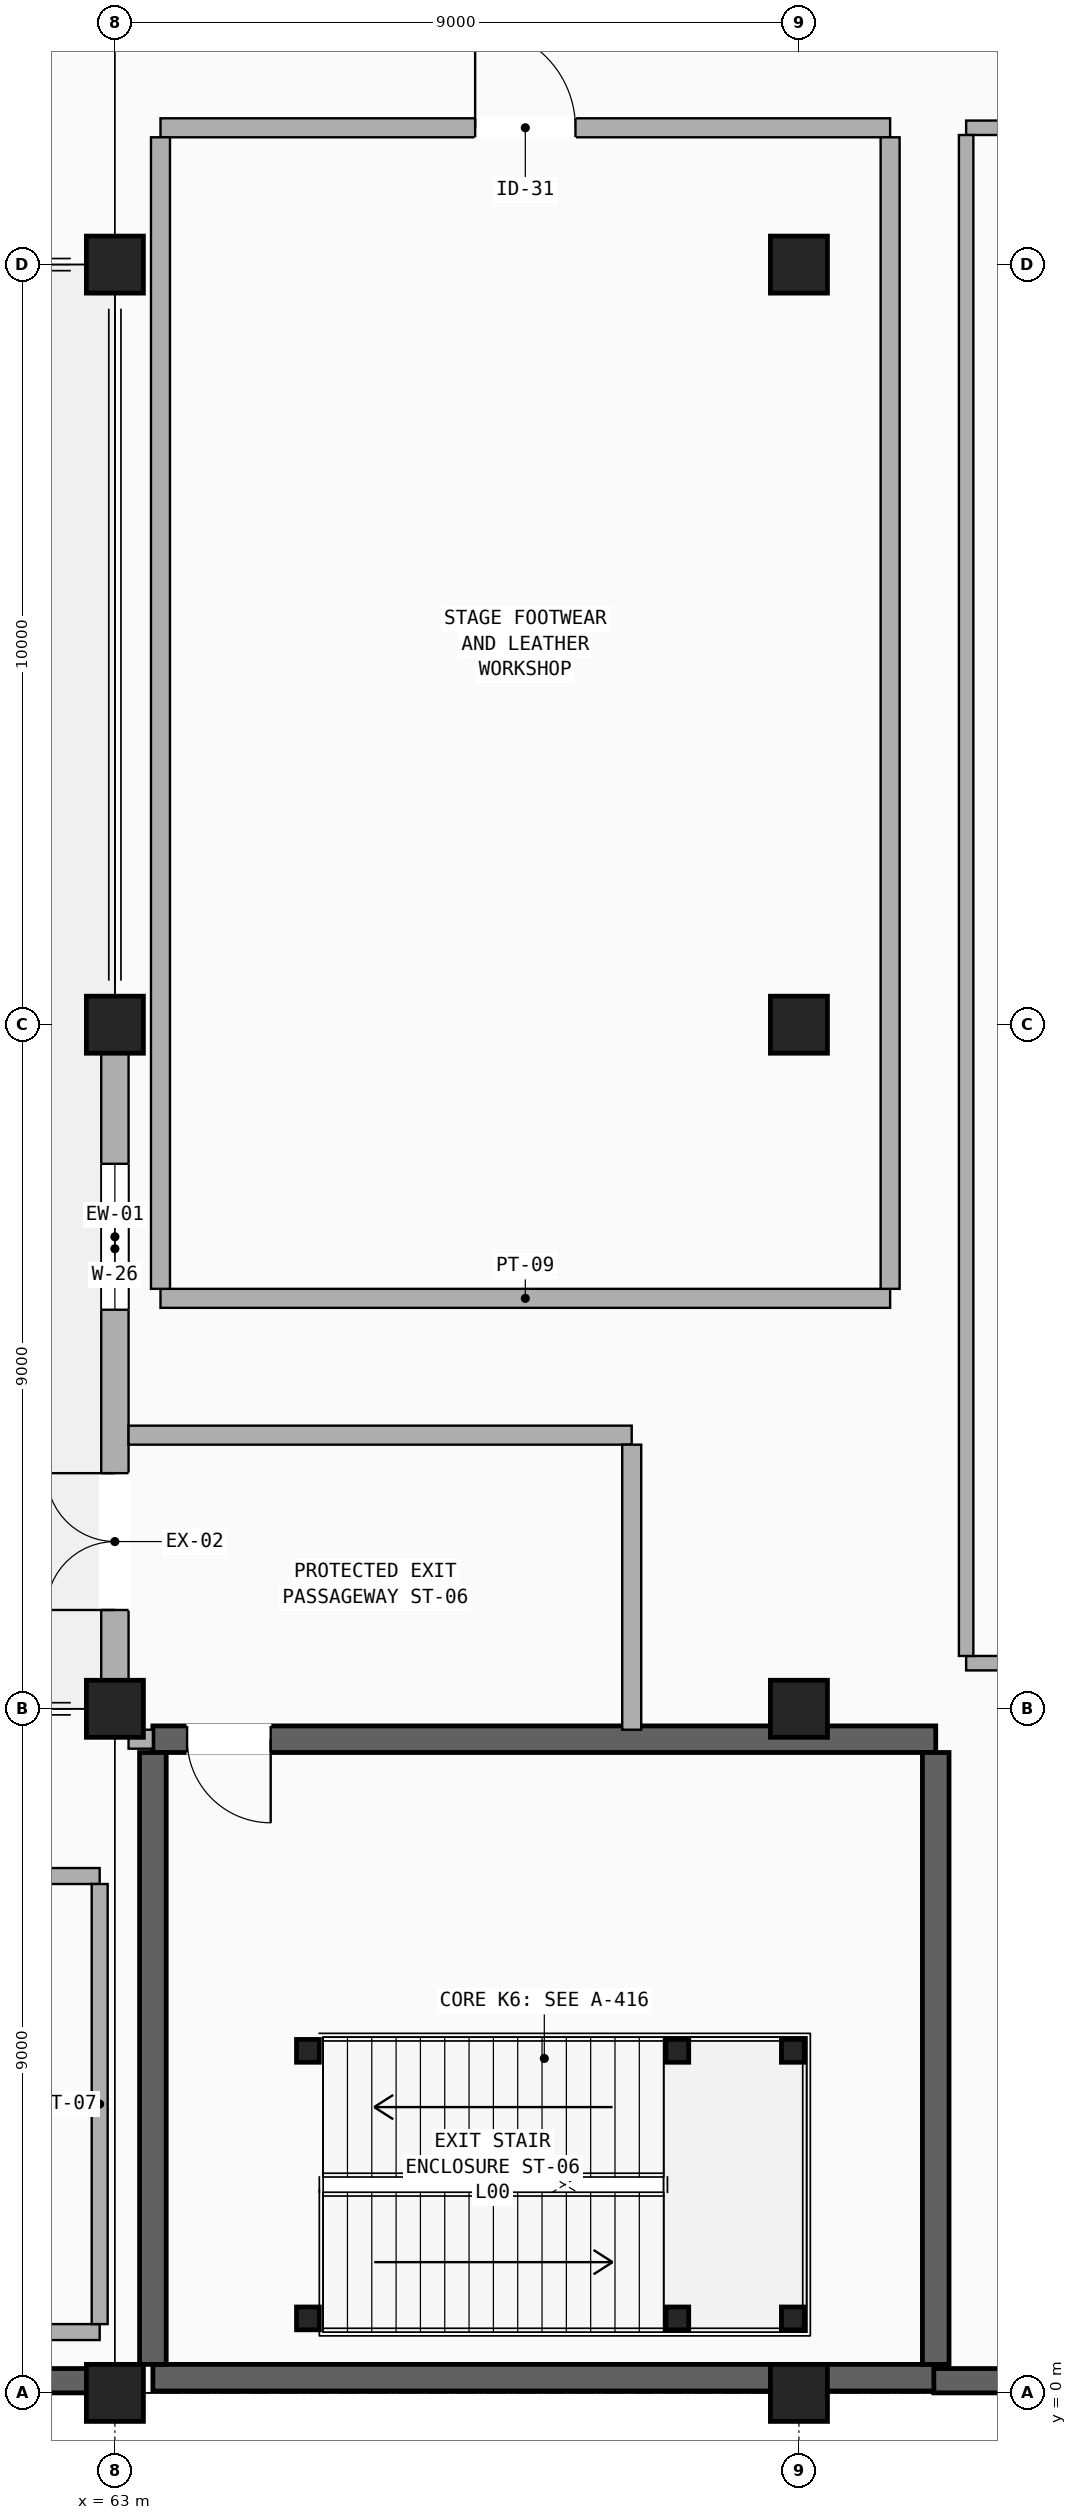
"""IFC4 building model, lengths in metres.
Left out: names, types, materials, properties, quantities, classifications, styles, units other than length and angle.
Written with IfcOpenShell. Run it as: python <this file> out.ifc"""

import sys

from ifc_helpers import new_model, si_unit, direction, frame, frame_2d, origin, origin_2d, place, context, subcontext, project, spatial, rectangle, hollow_rectangle, extrude, element, fill, save


model = new_model("IFC4")
c1 = context("Model", 3, precision=1e-05, world=origin(), true_north=direction((0.0, 1.0)))
c2 = subcontext(c1, "Body", "Model", "MODEL_VIEW")
j1 = project(units=[si_unit("LENGTHUNIT", "METRE"), si_unit("PLANEANGLEUNIT", "RADIAN")], contexts=[c1])
p1 = place(None, origin())
s1 = spatial("IfcSite", under=j1, at=p1, CompositionType="ELEMENT")
p2 = place(p1, origin())
s2 = spatial("IfcBuilding", under=s1, at=p2, CompositionType="ELEMENT")
p3 = place(p2, origin())
s3 = spatial("IfcBuildingStorey", under=s2, at=p3, CompositionType="ELEMENT", Elevation=0.0)
for number, where, z_axis, x_axis in (
    (1, (63.0, 0.0, 0.0), (0.0, 0.0, 1.0), (1.0, 0.0, 0.0)),
    (2, (63.0, 9.0, 0.0), (0.0, 0.0, 1.0), (1.0, 0.0, 0.0)),
    (3, (63.0, 18.0, 0.0), (0.0, 0.0, 1.0), (1.0, 0.0, 0.0)),
    (4, (63.0, 28.0, 0.0), (0.0, 0.0, 1.0), (1.0, 0.0, 0.0)),
    (5, (72.0, 0.0, 0.0), (0.0, 0.0, 1.0), (1.0, 0.0, 0.0)),
    (6, (72.0, 9.0, 0.0), (0.0, 0.0, 1.0), (1.0, 0.0, 0.0)),
    (7, (72.0, 18.0, 0.0), (0.0, 0.0, 1.0), (1.0, 0.0, 0.0)),
    (8, (72.0, 28.0, 0.0), (0.0, 0.0, 1.0), (1.0, 0.0, 0.0)),
):
    element("IfcColumn", number, at=place(p3, frame(where, z_axis=z_axis, x_axis=x_axis)), inside=s3, PredefinedType="COLUMN", context=c2, shape_type="SweptSolid", body=[
        extrude(rectangle(XDim=0.75, YDim=0.75, at=origin_2d()), origin(), (0.0, 0.0, 1.0), 5.1),
    ])
p4 = place(p3, frame((63.5, 0.2, 0.0), z_axis=(0.0, 0.0, 1.0), x_axis=(1.0, 0.0, 0.0)))
e9 = element("IfcWall", 9, at=p4, inside=s3, PredefinedType="SHEAR", context=c2, shape_type="SweptSolid", body=[
    extrude(rectangle(XDim=10.3, YDim=0.35, at=frame_2d((5.15, 0.0))), origin(), (0.0, 0.0, 1.0), 5.1),
])
p5 = place(p3, frame((63.5, 8.6, 0.0), z_axis=(0.0, 0.0, 1.0), x_axis=(1.0, 0.0, 0.0)))
e10 = element("IfcWall", 10, at=p5, inside=s3, PredefinedType="SHEAR", context=c2, shape_type="SweptSolid", body=[
    extrude(rectangle(XDim=10.3, YDim=0.35, at=frame_2d((5.15, 0.0))), origin(), (0.0, 0.0, 1.0), 5.1),
])
p6 = place(p5, frame((0.45, 0.0, 0.0)))
e11 = element("IfcOpeningElement", 11, at=p6, cuts=e10, PredefinedType="OPENING", context=c2, shape_type="SweptSolid", body=[
    extrude(rectangle(XDim=1.1, YDim=2.2, at=frame_2d((0.55, 1.1))), frame((0.0, 0.185, 0.0), z_axis=(0.0, -1.0, 0.0), x_axis=(1.0, 0.0, 0.0)), (0.0, 0.0, 1.0), 0.37),
])
for number, where, z_axis, x_axis in (
    (12, (63.5, 0.375, 0.0), (0.0, 0.0, 1.0), (0.0, 1.0, 0.0)),
    (13, (73.8, 0.375, 0.0), (0.0, 0.0, 1.0), (0.0, 1.0, 0.0)),
):
    element("IfcWall", number, at=place(p3, frame(where, z_axis=z_axis, x_axis=x_axis)), inside=s3, PredefinedType="SHEAR", context=c2, shape_type="SweptSolid", body=[
        extrude(rectangle(XDim=8.05, YDim=0.35, at=frame_2d((4.025, 0.0))), origin(), (0.0, 0.0, 1.0), 5.1),
    ])
p7 = place(p3, frame((0.35, 0.16, 0.0), z_axis=(0.0, 0.0, 1.0), x_axis=(1.0, 0.0, 0.0)))
e14 = element("IfcWall", 14, at=p7, inside=s3, PredefinedType="SHEAR", context=c2, shape_type="SweptSolid", body=[
    extrude(rectangle(XDim=62.95, YDim=0.32, at=frame_2d((31.475, 0.0))), origin(), (0.0, 0.0, 1.0), 5.1),
])
p8 = place(p3, frame((73.775, 0.16, 0.0), z_axis=(0.0, 0.0, 1.0), x_axis=(1.0, 0.0, 0.0)))
e15 = element("IfcWall", 15, at=p8, inside=s3, PredefinedType="SHEAR", context=c2, shape_type="SweptSolid", body=[
    extrude(rectangle(XDim=89.875, YDim=0.32, at=frame_2d((44.938, 0.0))), origin(), (0.0, 0.0, 1.0), 5.1),
])
p9 = place(p3, frame((63.0, 9.375, 0.0), z_axis=(0.0, 0.0, 1.0), x_axis=(0.0, 1.0, 0.0)))
e16 = element("IfcWall", 16, at=p9, inside=s3, PredefinedType="STANDARD", context=c2, shape_type="SweptSolid", body=[
    extrude(rectangle(XDim=8.25, YDim=0.36, at=frame_2d((4.125, 0.0))), origin(), (0.0, 0.0, 1.0), 3.98),
])
p10 = place(p9, frame((0.925, 0.0, 0.0)))
e17 = element("IfcOpeningElement", 17, at=p10, cuts=e16, PredefinedType="OPENING", context=c2, shape_type="SweptSolid", body=[
    extrude(rectangle(XDim=1.8, YDim=2.3, at=frame_2d((0.9, 1.15))), frame((0.0, 0.19, 0.0), z_axis=(0.0, -1.0, 0.0), x_axis=(1.0, 0.0, 0.0)), (0.0, 0.0, 1.0), 0.38),
])
p11 = place(p9, frame((4.875, 0.0, 0.9)))
e18 = element("IfcOpeningElement", 18, at=p11, cuts=e16, PredefinedType="OPENING", context=c2, shape_type="SweptSolid", body=[
    extrude(rectangle(XDim=1.92, YDim=2.15, at=frame_2d((0.96, 1.075))), frame((0.0, 0.19, 0.0), z_axis=(0.0, -1.0, 0.0), x_axis=(1.0, 0.0, 0.0)), (0.0, 0.0, 1.0), 0.38),
])
for number, where, z_axis, x_axis in (
    (19, (65.54, 0.98, 0.0), (0.0, 0.0, 1.0), (1.0, 0.0, 0.0)),
    (20, (65.54, 4.5, 0.0), (0.0, 0.0, 1.0), (1.0, 0.0, 0.0)),
    (21, (70.4, 0.98, 0.0), (0.0, 0.0, 1.0), (1.0, 0.0, 0.0)),
    (22, (70.4, 4.5, 0.0), (0.0, 0.0, 1.0), (1.0, 0.0, 0.0)),
    (23, (71.92, 0.98, 0.0), (0.0, 0.0, 1.0), (1.0, 0.0, 0.0)),
    (24, (71.92, 4.5, 0.0), (0.0, 0.0, 1.0), (1.0, 0.0, 0.0)),
):
    element("IfcColumn", number, at=place(p3, frame(where, z_axis=z_axis, x_axis=x_axis)), inside=s3, PredefinedType="COLUMN", context=c2, shape_type="SweptSolid", body=[
        extrude(hollow_rectangle(XDim=0.3, YDim=0.3, WallThickness=0.016, InnerFilletRadius=0.016, OuterFilletRadius=0.032, at=origin_2d()), origin(), (0.0, 0.0, 1.0), 5.1),
    ])
p12 = place(p3, frame((74.2, 9.6, 0.0), z_axis=(0.0, 0.0, 1.0), x_axis=(1.0, 0.0, 0.0)))
e25 = element("IfcWall", 25, at=p12, inside=s3, PredefinedType="PARTITIONING", context=c2, shape_type="SweptSolid", body=[
    extrude(rectangle(XDim=37.4, YDim=0.19, at=frame_2d((18.7, 0.0))), origin(), (0.0, 0.0, 1.0), 4.13),
])
p13 = place(p3, frame((74.2, 29.8, 0.0), z_axis=(0.0, 0.0, 1.0), x_axis=(1.0, 0.0, 0.0)))
e26 = element("IfcWall", 26, at=p13, inside=s3, PredefinedType="PARTITIONING", context=c2, shape_type="SweptSolid", body=[
    extrude(rectangle(XDim=37.4, YDim=0.19, at=frame_2d((18.7, 0.0))), origin(), (0.0, 0.0, 1.0), 3.98),
])
p14 = place(p13, frame((18.24, 0.0, 0.0)))
e27 = element("IfcOpeningElement", 27, at=p14, cuts=e26, PredefinedType="OPENING", context=c2, shape_type="SweptSolid", body=[
    extrude(rectangle(XDim=0.92, YDim=2.08, at=frame_2d((0.46, 1.04))), frame((0.0, 0.105, 0.0), z_axis=(0.0, -1.0, 0.0), x_axis=(1.0, 0.0, 0.0)), (0.0, 0.0, 1.0), 0.21),
])
p15 = place(p13, frame((8.228, 0.0, 0.0)))
e28 = element("IfcOpeningElement", 28, at=p15, cuts=e26, PredefinedType="OPENING", context=c2, shape_type="SweptSolid", body=[
    extrude(rectangle(XDim=0.92, YDim=2.14, at=frame_2d((0.46, 1.07))), frame((0.0, 0.105, 0.0), z_axis=(0.0, -1.0, 0.0), x_axis=(1.0, 0.0, 0.0)), (0.0, 0.0, 1.0), 0.21),
])
p16 = place(p3, frame((74.2, 9.695, 0.0), z_axis=(0.0, 0.0, 1.0), x_axis=(0.0, 1.0, 0.0)))
e29 = element("IfcWall", 29, at=p16, inside=s3, PredefinedType="PARTITIONING", context=c2, shape_type="SweptSolid", body=[
    extrude(rectangle(XDim=20.01, YDim=0.19, at=frame_2d((10.005, 0.0))), origin(), (0.0, 0.0, 1.0), 3.83),
])
p17 = place(p3, frame((38.4, 0.8, 0.0), z_axis=(0.0, 0.0, 1.0), x_axis=(1.0, 0.0, 0.0)))
e30 = element("IfcWall", 30, at=p17, inside=s3, PredefinedType="PARTITIONING", context=c2, shape_type="SweptSolid", body=[
    extrude(rectangle(XDim=24.4, YDim=0.21, at=frame_2d((12.2, 0.0))), origin(), (0.0, 0.0, 1.0), 4.13),
])
p18 = place(p3, frame((38.4, 6.8, 0.0), z_axis=(0.0, 0.0, 1.0), x_axis=(1.0, 0.0, 0.0)))
e31 = element("IfcWall", 31, at=p18, inside=s3, PredefinedType="PARTITIONING", context=c2, shape_type="SweptSolid", body=[
    extrude(rectangle(XDim=24.4, YDim=0.21, at=frame_2d((12.2, 0.0))), origin(), (0.0, 0.0, 1.0), 4.13),
])
p19 = place(p18, frame((11.74, 0.0, 0.0)))
e32 = element("IfcOpeningElement", 32, at=p19, cuts=e31, PredefinedType="OPENING", context=c2, shape_type="SweptSolid", body=[
    extrude(rectangle(XDim=0.92, YDim=2.22, at=frame_2d((0.46, 1.11))), frame((0.0, 0.115, 0.0), z_axis=(0.0, -1.0, 0.0), x_axis=(1.0, 0.0, 0.0)), (0.0, 0.0, 1.0), 0.23),
])
p20 = place(p18, frame((5.368, 0.0, 0.0)))
e33 = element("IfcOpeningElement", 33, at=p20, cuts=e31, PredefinedType="OPENING", context=c2, shape_type="SweptSolid", body=[
    extrude(rectangle(XDim=0.98, YDim=2.08, at=frame_2d((0.49, 1.04))), frame((0.0, 0.115, 0.0), z_axis=(0.0, -1.0, 0.0), x_axis=(1.0, 0.0, 0.0)), (0.0, 0.0, 1.0), 0.23),
])
p21 = place(p3, frame((62.8, 0.905, 0.0), z_axis=(0.0, 0.0, 1.0), x_axis=(0.0, 1.0, 0.0)))
e34 = element("IfcWall", 34, at=p21, inside=s3, PredefinedType="PARTITIONING", context=c2, shape_type="SweptSolid", body=[
    extrude(rectangle(XDim=5.79, YDim=0.21, at=frame_2d((2.895, 0.0))), origin(), (0.0, 0.0, 1.0), 4.18),
])
p22 = place(p3, frame((63.6, 14.4, 0.0), z_axis=(0.0, 0.0, 1.0), x_axis=(1.0, 0.0, 0.0)))
e35 = element("IfcWall", 35, at=p22, inside=s3, PredefinedType="PARTITIONING", context=c2, shape_type="SweptSolid", body=[
    extrude(rectangle(XDim=9.6, YDim=0.25, at=frame_2d((4.8, 0.0))), origin(), (0.0, 0.0, 1.0), 4.18),
])
p23 = place(p3, frame((63.6, 29.8, 0.0), z_axis=(0.0, 0.0, 1.0), x_axis=(1.0, 0.0, 0.0)))
e36 = element("IfcWall", 36, at=p23, inside=s3, PredefinedType="PARTITIONING", context=c2, shape_type="SweptSolid", body=[
    extrude(rectangle(XDim=9.6, YDim=0.25, at=frame_2d((4.8, 0.0))), origin(), (0.0, 0.0, 1.0), 4.13),
])
p24 = place(p23, frame((4.14, 0.0, 0.0)))
e37 = element("IfcOpeningElement", 37, at=p24, cuts=e36, PredefinedType="OPENING", context=c2, shape_type="SweptSolid", body=[
    extrude(rectangle(XDim=1.32, YDim=2.08, at=frame_2d((0.66, 1.04))), frame((0.0, 0.135, 0.0), z_axis=(0.0, -1.0, 0.0), x_axis=(1.0, 0.0, 0.0)), (0.0, 0.0, 1.0), 0.27),
])
p25 = place(p3, frame((63.6, 14.525, 0.0), z_axis=(0.0, 0.0, 1.0), x_axis=(0.0, 1.0, 0.0)))
e38 = element("IfcWall", 38, at=p25, inside=s3, PredefinedType="PARTITIONING", context=c2, shape_type="SweptSolid", body=[
    extrude(rectangle(XDim=15.15, YDim=0.25, at=frame_2d((7.575, 0.0))), origin(), (0.0, 0.0, 1.0), 3.93),
])
p26 = place(p3, frame((73.2, 14.525, 0.0), z_axis=(0.0, 0.0, 1.0), x_axis=(0.0, 1.0, 0.0)))
e39 = element("IfcWall", 39, at=p26, inside=s3, PredefinedType="PARTITIONING", context=c2, shape_type="SweptSolid", body=[
    extrude(rectangle(XDim=15.15, YDim=0.25, at=frame_2d((7.575, 0.0))), origin(), (0.0, 0.0, 1.0), 3.83),
])
p27 = place(p3, frame((63.18, 8.6, 0.0), z_axis=(0.0, 0.0, 1.0), x_axis=(1.0, 0.0, 0.0)))
e40 = element("IfcWall", 40, at=p27, inside=s3, PredefinedType="PARTITIONING", context=c2, shape_type="SweptSolid", body=[
    extrude(rectangle(XDim=0.32, YDim=0.25, at=frame_2d((0.16, 0.0))), origin(), (0.0, 0.0, 1.0), 3.83),
])
p28 = place(p3, frame((63.18, 12.6, 0.0), z_axis=(0.0, 0.0, 1.0), x_axis=(1.0, 0.0, 0.0)))
e41 = element("IfcWall", 41, at=p28, inside=s3, PredefinedType="PARTITIONING", context=c2, shape_type="SweptSolid", body=[
    extrude(rectangle(XDim=6.62, YDim=0.25, at=frame_2d((3.31, 0.0))), origin(), (0.0, 0.0, 1.0), 3.98),
])
p29 = place(p3, frame((63.18, 8.725, 0.0), z_axis=(0.0, 0.0, 1.0), x_axis=(0.0, 1.0, 0.0)))
e42 = element("IfcWall", 42, at=p29, inside=s3, PredefinedType="PARTITIONING", context=c2, shape_type="SweptSolid", body=[
    extrude(rectangle(XDim=0.65, YDim=0.25, at=frame_2d((0.325, 0.0))), origin(), (0.0, 0.0, 1.0), 3.83),
])
p30 = place(p3, frame((69.8, 8.725, 0.0), z_axis=(0.0, 0.0, 1.0), x_axis=(0.0, 1.0, 0.0)))
e43 = element("IfcWall", 43, at=p30, inside=s3, PredefinedType="PARTITIONING", context=c2, shape_type="SweptSolid", body=[
    extrude(rectangle(XDim=3.75, YDim=0.25, at=frame_2d((1.875, 0.0))), origin(), (0.0, 0.0, 1.0), 3.83),
])
p31 = place(p10, origin())
e44 = element("IfcDoor", 44, at=p31, inside=s3, OperationType="DOUBLE_DOOR_SINGLE_SWING", PredefinedType="DOOR", context=c2, shape_type="SweptSolid", body=[
    extrude(rectangle(XDim=1.8, YDim=2.3, at=frame_2d((0.9, 1.15))), frame((0.0, 0.025, 0.0), z_axis=(0.0, -1.0, 0.0), x_axis=(1.0, 0.0, 0.0)), (0.0, 0.0, 1.0), 0.05),
])
fill(e17, e44)
p32 = place(p11, origin())
e45 = element("IfcWindow", 45, at=p32, inside=s3, PartitioningType="DOUBLE_PANEL_VERTICAL", PredefinedType="WINDOW", context=c2, shape_type="SweptSolid", body=[
    extrude(rectangle(XDim=1.92, YDim=2.15, at=frame_2d((0.96, 1.075))), frame((0.0, 0.03, 0.0), z_axis=(0.0, -1.0, 0.0), x_axis=(1.0, 0.0, 0.0)), (0.0, 0.0, 1.0), 0.06),
])
fill(e18, e45)
p33 = place(p6, frame((1.1, 0.0, 0.0), z_axis=(0.0, 0.0, 1.0), x_axis=(-1.0, 0.0, 0.0)))
e46 = element("IfcDoor", 46, at=p33, inside=s3, OperationType="SINGLE_SWING_LEFT", PredefinedType="DOOR", context=c2, shape_type="SweptSolid", body=[
    extrude(rectangle(XDim=1.1, YDim=2.2, at=frame_2d((0.55, 1.1))), frame((0.0, 0.025, 0.0), z_axis=(0.0, -1.0, 0.0), x_axis=(1.0, 0.0, 0.0)), (0.0, 0.0, 1.0), 0.05),
])
fill(e11, e46)
p34 = place(p24, origin())
e47 = element("IfcDoor", 47, at=p34, inside=s3, OperationType="SINGLE_SWING_LEFT", PredefinedType="DOOR", context=c2, shape_type="SweptSolid", body=[
    extrude(rectangle(XDim=1.32, YDim=2.08, at=frame_2d((0.66, 1.04))), frame((0.0, 0.025, 0.0), z_axis=(0.0, -1.0, 0.0), x_axis=(1.0, 0.0, 0.0)), (0.0, 0.0, 1.0), 0.05),
])
fill(e37, e47)
save(model, sys.argv[1])
